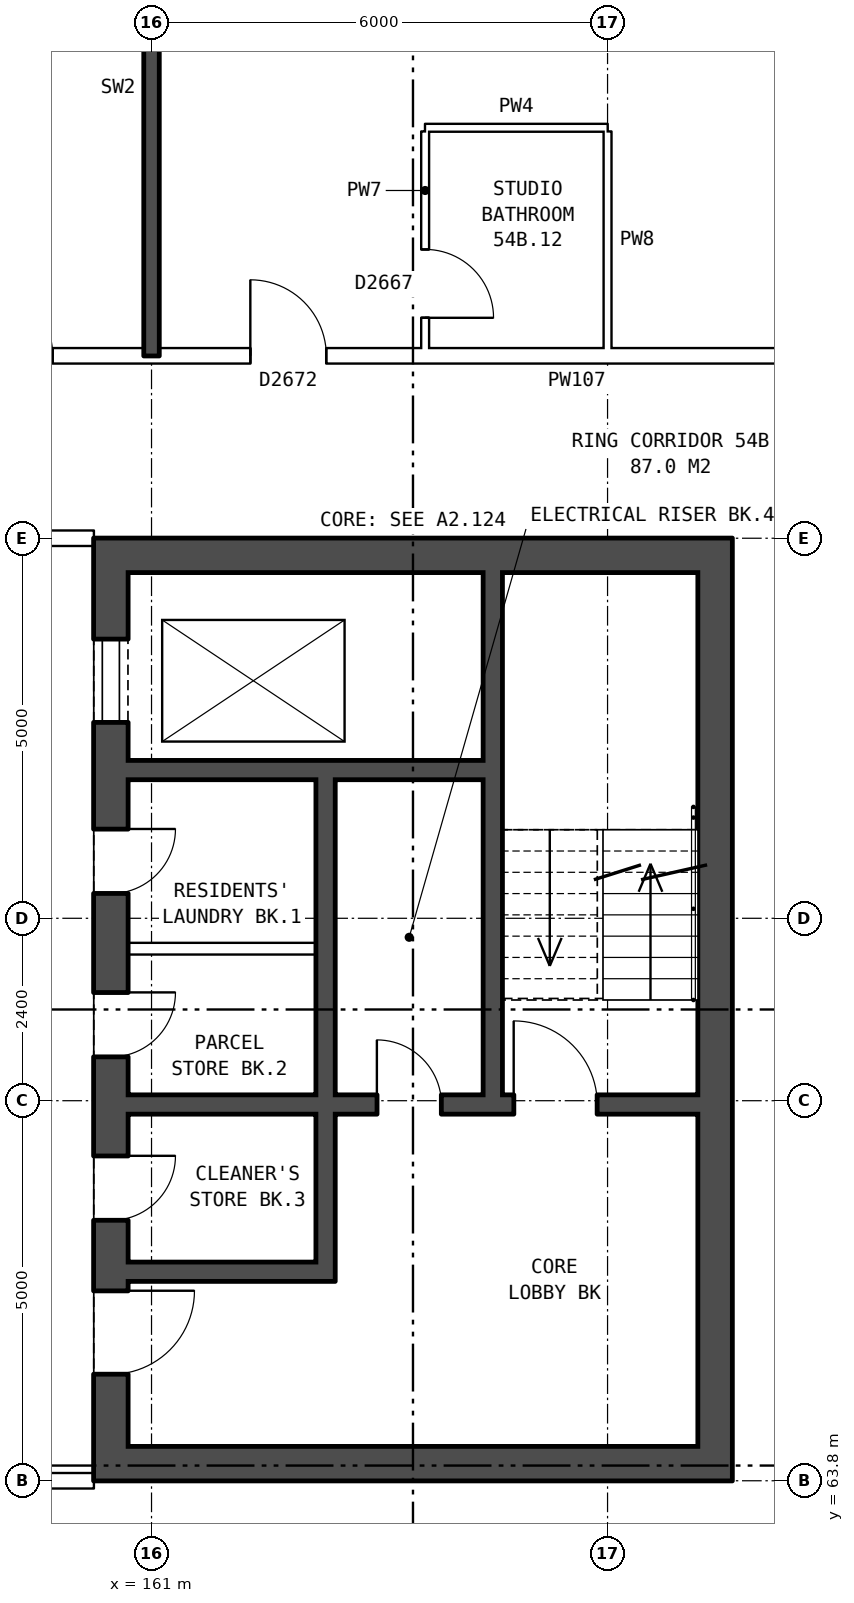
"""IFC4 building model, lengths in metres.
Left out: names, types, materials, properties, quantities, classifications, styles, units other than length and angle.
Written with IfcOpenShell. Run it as: python <this file> out.ifc"""

import sys

from ifc_helpers import new_model, si_unit, direction, frame, frame_2d, origin, place, context, subcontext, project, spatial, rectangle, extrude, element, fill, save


model = new_model("IFC4")
c1 = context("Model", 3, precision=1e-05, world=origin(), true_north=direction((0.0, 1.0)))
c2 = subcontext(c1, "Body", "Model", "MODEL_VIEW")
j1 = project(units=[si_unit("LENGTHUNIT", "METRE"), si_unit("PLANEANGLEUNIT", "RADIAN")], contexts=[c1])
p1 = place(None, origin())
s1 = spatial("IfcSite", under=j1, at=p1, CompositionType="ELEMENT")
p2 = place(p1, origin())
s2 = spatial("IfcBuilding", under=s1, at=p2, CompositionType="ELEMENT")
p3 = place(p2, frame((0.0, 0.0, 191.3)))
s3 = spatial("IfcBuildingStorey", under=s2, at=p3, CompositionType="ELEMENT", Elevation=191.3)
p4 = place(p3, frame((160.465, 76.2, 0.0), z_axis=(0.0, 0.0, 1.0), x_axis=(0.0, -1.0, 0.0)))
e1 = element("IfcWall", 1, at=p4, inside=s3, PredefinedType="SHEAR", context=c2, shape_type="SweptSolid", body=[
    extrude(rectangle(XDim=12.4, YDim=0.45, at=frame_2d((6.2, 0.0))), origin(), (0.0, 0.0, 1.0), 2.85),
])
p5 = place(p4, frame((1.325, 0.0, 0.0)))
e2 = element("IfcOpeningElement", 2, at=p5, cuts=e1, PredefinedType="OPENING", context=c2, shape_type="SweptSolid", body=[
    extrude(rectangle(XDim=1.1, YDim=2.1, at=frame_2d((0.55, 1.05))), frame((0.0, 0.235, 0.0), z_axis=(0.0, -1.0, 0.0), x_axis=(1.0, 0.0, 0.0)), (0.0, 0.0, 1.0), 0.47),
])
p6 = place(p4, frame((3.825, 0.0, 0.0)))
e3 = element("IfcOpeningElement", 3, at=p6, cuts=e1, PredefinedType="OPENING", context=c2, shape_type="SweptSolid", body=[
    extrude(rectangle(XDim=0.85, YDim=2.1, at=frame_2d((0.425, 1.05))), frame((0.0, 0.235, 0.0), z_axis=(0.0, -1.0, 0.0), x_axis=(1.0, 0.0, 0.0)), (0.0, 0.0, 1.0), 0.47),
])
p7 = place(p4, frame((5.975, 0.0, 0.0)))
e4 = element("IfcOpeningElement", 4, at=p7, cuts=e1, PredefinedType="OPENING", context=c2, shape_type="SweptSolid", body=[
    extrude(rectangle(XDim=0.85, YDim=2.1, at=frame_2d((0.425, 1.05))), frame((0.0, 0.235, 0.0), z_axis=(0.0, -1.0, 0.0), x_axis=(1.0, 0.0, 0.0)), (0.0, 0.0, 1.0), 0.47),
])
p8 = place(p4, frame((9.9, 0.0, 0.0)))
e5 = element("IfcOpeningElement", 5, at=p8, cuts=e1, PredefinedType="OPENING", context=c2, shape_type="SweptSolid", body=[
    extrude(rectangle(XDim=1.1, YDim=2.1, at=frame_2d((0.55, 1.05))), frame((0.0, 0.235, 0.0), z_axis=(0.0, -1.0, 0.0), x_axis=(1.0, 0.0, 0.0)), (0.0, 0.0, 1.0), 0.47),
])
p9 = place(p4, frame((8.125, 0.0, 0.0)))
e6 = element("IfcOpeningElement", 6, at=p9, cuts=e1, PredefinedType="OPENING", context=c2, shape_type="SweptSolid", body=[
    extrude(rectangle(XDim=0.85, YDim=2.1, at=frame_2d((0.425, 1.05))), frame((0.0, 0.235, 0.0), z_axis=(0.0, -1.0, 0.0), x_axis=(1.0, 0.0, 0.0)), (0.0, 0.0, 1.0), 0.47),
])
p10 = place(p3, frame((168.415, 76.2, 0.0), z_axis=(0.0, 0.0, 1.0), x_axis=(0.0, -1.0, 0.0)))
e7 = element("IfcWall", 7, at=p10, inside=s3, PredefinedType="SHEAR", context=c2, shape_type="SweptSolid", body=[
    extrude(rectangle(XDim=12.4, YDim=0.45, at=frame_2d((6.2, 0.0))), origin(), (0.0, 0.0, 1.0), 2.85),
])
for number, where, z_axis, x_axis in (
    (8, (160.69, 75.975, 0.0), (0.0, 0.0, 1.0), (1.0, 0.0, 0.0)),
    (9, (160.69, 64.025, 0.0), (0.0, 0.0, 1.0), (1.0, 0.0, 0.0)),
):
    element("IfcWall", number, at=place(p3, frame(where, z_axis=z_axis, x_axis=x_axis)), inside=s3, PredefinedType="SHEAR", context=c2, shape_type="SweptSolid", body=[
        extrude(rectangle(XDim=7.5, YDim=0.45, at=frame_2d((3.75, 0.0))), origin(), (0.0, 0.0, 1.0), 2.85),
    ])
p11 = place(p3, frame((160.69, 73.15, 0.0), z_axis=(0.0, 0.0, 1.0), x_axis=(1.0, 0.0, 0.0)))
e10 = element("IfcWall", 10, at=p11, inside=s3, PredefinedType="SHEAR", context=c2, shape_type="SweptSolid", body=[
    extrude(rectangle(XDim=4.675, YDim=0.25, at=frame_2d((2.337, 0.0))), origin(), (0.0, 0.0, 1.0), 2.85),
])
p12 = place(p3, frame((160.69, 70.8, 0.0), z_axis=(0.0, 0.0, 1.0), x_axis=(1.0, 0.0, 0.0)))
e11 = element("IfcWall", 11, at=p12, inside=s3, PredefinedType="PARTITIONING", context=c2, shape_type="SweptSolid", body=[
    extrude(rectangle(XDim=2.475, YDim=0.15, at=frame_2d((1.238, 0.0))), origin(), (0.0, 0.0, 1.0), 2.85),
])
p13 = place(p3, frame((160.69, 68.75, 0.0), z_axis=(0.0, 0.0, 1.0), x_axis=(1.0, 0.0, 0.0)))
e12 = element("IfcWall", 12, at=p13, inside=s3, PredefinedType="SHEAR", context=c2, shape_type="SweptSolid", body=[
    extrude(rectangle(XDim=7.5, YDim=0.25, at=frame_2d((3.75, 0.0))), origin(), (0.0, 0.0, 1.0), 2.85),
])
p14 = place(p13, frame((5.075, 0.0, 0.0)))
e13 = element("IfcOpeningElement", 13, at=p14, cuts=e12, PredefinedType="OPENING", context=c2, shape_type="SweptSolid", body=[
    extrude(rectangle(XDim=1.1, YDim=2.1, at=frame_2d((0.55, 1.05))), frame((0.0, 0.135, 0.0), z_axis=(0.0, -1.0, 0.0), x_axis=(1.0, 0.0, 0.0)), (0.0, 0.0, 1.0), 0.27),
])
p15 = place(p13, frame((3.275, 0.0, 0.0)))
e14 = element("IfcOpeningElement", 14, at=p15, cuts=e12, PredefinedType="OPENING", context=c2, shape_type="SweptSolid", body=[
    extrude(rectangle(XDim=0.85, YDim=2.1, at=frame_2d((0.425, 1.05))), frame((0.0, 0.135, 0.0), z_axis=(0.0, -1.0, 0.0), x_axis=(1.0, 0.0, 0.0)), (0.0, 0.0, 1.0), 0.27),
])
p16 = place(p3, frame((160.69, 66.55, 0.0), z_axis=(0.0, 0.0, 1.0), x_axis=(1.0, 0.0, 0.0)))
e15 = element("IfcWall", 15, at=p16, inside=s3, PredefinedType="SHEAR", context=c2, shape_type="SweptSolid", body=[
    extrude(rectangle(XDim=2.475, YDim=0.25, at=frame_2d((1.238, 0.0))), origin(), (0.0, 0.0, 1.0), 2.85),
])
p17 = place(p3, frame((163.29, 73.025, 0.0), z_axis=(0.0, 0.0, 1.0), x_axis=(0.0, -1.0, 0.0)))
e16 = element("IfcWall", 16, at=p17, inside=s3, PredefinedType="SHEAR", context=c2, shape_type="SweptSolid", body=[
    extrude(rectangle(XDim=4.15, YDim=0.25, at=frame_2d((2.075, 0.0))), origin(), (0.0, 0.0, 1.0), 2.85),
])
p18 = place(p3, frame((163.29, 68.625, 0.0), z_axis=(0.0, 0.0, 1.0), x_axis=(0.0, -1.0, 0.0)))
e17 = element("IfcWall", 17, at=p18, inside=s3, PredefinedType="SHEAR", context=c2, shape_type="SweptSolid", body=[
    extrude(rectangle(XDim=2.2, YDim=0.25, at=frame_2d((1.1, 0.0))), origin(), (0.0, 0.0, 1.0), 2.85),
])
p19 = place(p3, frame((165.49, 75.75, 0.0), z_axis=(0.0, 0.0, 1.0), x_axis=(0.0, -1.0, 0.0)))
e18 = element("IfcWall", 18, at=p19, inside=s3, PredefinedType="SHEAR", context=c2, shape_type="SweptSolid", body=[
    extrude(rectangle(XDim=6.875, YDim=0.25, at=frame_2d((3.438, 0.0))), origin(), (0.0, 0.0, 1.0), 2.85),
])
p20 = place(p3, frame((157.24, 63.8, 0.0), z_axis=(0.0, 0.0, 1.0), x_axis=(1.0, 0.0, 0.0)))
e19 = element("IfcWall", 19, at=p20, inside=s3, PredefinedType="PARTITIONING", context=c2, shape_type="SweptSolid", body=[
    extrude(rectangle(XDim=3.0, YDim=0.2, at=frame_2d((1.5, 0.0))), origin(), (0.0, 0.0, 1.0), 2.85),
])
p21 = place(p20, frame((1.0, 0.0, 0.0)))
e20 = element("IfcOpeningElement", 20, at=p21, cuts=e19, PredefinedType="OPENING", context=c2, shape_type="SweptSolid", body=[
    extrude(rectangle(XDim=1.0, YDim=2.1, at=frame_2d((0.5, 1.05))), frame((0.0, 0.11, 0.0), z_axis=(0.0, -1.0, 0.0), x_axis=(1.0, 0.0, 0.0)), (0.0, 0.0, 1.0), 0.22),
])
p22 = place(p3, frame((157.24, 76.2, 0.0), z_axis=(0.0, 0.0, 1.0), x_axis=(1.0, 0.0, 0.0)))
e21 = element("IfcWall", 21, at=p22, inside=s3, PredefinedType="PARTITIONING", context=c2, shape_type="SweptSolid", body=[
    extrude(rectangle(XDim=3.0, YDim=0.2, at=frame_2d((1.5, 0.0))), origin(), (0.0, 0.0, 1.0), 2.85),
])
p23 = place(p22, frame((1.0, 0.0, 0.0)))
e22 = element("IfcOpeningElement", 22, at=p23, cuts=e21, PredefinedType="OPENING", context=c2, shape_type="SweptSolid", body=[
    extrude(rectangle(XDim=1.0, YDim=2.1, at=frame_2d((0.5, 1.05))), frame((0.0, 0.11, 0.0), z_axis=(0.0, -1.0, 0.0), x_axis=(1.0, 0.0, 0.0)), (0.0, 0.0, 1.0), 0.22),
])
p24 = place(p3, frame((155.1, 78.6, 0.0), z_axis=(0.0, 0.0, 1.0), x_axis=(1.0, 0.0, 0.0)))
e23 = element("IfcWall", 23, at=p24, inside=s3, PredefinedType="PARTITIONING", context=c2, shape_type="SweptSolid", body=[
    extrude(rectangle(XDim=14.79, YDim=0.2, at=frame_2d((7.395, 0.0))), origin(), (0.0, 0.0, 1.0), 2.85),
])
p25 = place(p24, frame((3.6, 0.0, 0.0)))
e24 = element("IfcOpeningElement", 24, at=p25, cuts=e23, PredefinedType="OPENING", context=c2, shape_type="SweptSolid", body=[
    extrude(rectangle(XDim=1.0, YDim=2.1, at=frame_2d((0.5, 1.05))), frame((0.0, 0.11, 0.0), z_axis=(0.0, -1.0, 0.0), x_axis=(1.0, 0.0, 0.0)), (0.0, 0.0, 1.0), 0.22),
])
p26 = place(p24, frame((7.2, 0.0, 0.0)))
e25 = element("IfcOpeningElement", 25, at=p26, cuts=e23, PredefinedType="OPENING", context=c2, shape_type="SweptSolid", body=[
    extrude(rectangle(XDim=1.0, YDim=2.1, at=frame_2d((0.5, 1.05))), frame((0.0, 0.11, 0.0), z_axis=(0.0, -1.0, 0.0), x_axis=(1.0, 0.0, 0.0)), (0.0, 0.0, 1.0), 0.22),
])
p27 = place(p3, frame((164.6, 81.6, 0.0), z_axis=(0.0, 0.0, 1.0), x_axis=(1.0, 0.0, 0.0)))
e26 = element("IfcWall", 26, at=p27, inside=s3, PredefinedType="PARTITIONING", context=c2, shape_type="SweptSolid", body=[
    extrude(rectangle(XDim=2.4, YDim=0.1, at=frame_2d((1.2, 0.0))), origin(), (0.0, 0.0, 1.0), 2.85),
])
p28 = place(p3, frame((161.0, 78.6, 0.0), z_axis=(0.0, 0.0, 1.0), x_axis=(0.0, 1.0, 0.0)))
e27 = element("IfcWall", 27, at=p28, inside=s3, PredefinedType="SOLIDWALL", context=c2, shape_type="SweptSolid", body=[
    extrude(rectangle(XDim=7.04, YDim=0.2, at=frame_2d((3.52, 0.0))), origin(), (0.0, 0.0, 1.0), 2.85),
])
p29 = place(p3, frame((164.6, 78.7, 0.0), z_axis=(0.0, 0.0, 1.0), x_axis=(0.0, 1.0, 0.0)))
e28 = element("IfcWall", 28, at=p29, inside=s3, PredefinedType="PARTITIONING", context=c2, shape_type="SweptSolid", body=[
    extrude(rectangle(XDim=2.85, YDim=0.1, at=frame_2d((1.425, 0.0))), origin(), (0.0, 0.0, 1.0), 2.85),
])
p30 = place(p29, frame((0.4, 0.0, 0.0)))
e29 = element("IfcOpeningElement", 29, at=p30, cuts=e28, PredefinedType="OPENING", context=c2, shape_type="SweptSolid", body=[
    extrude(rectangle(XDim=0.9, YDim=2.1, at=frame_2d((0.45, 1.05))), frame((0.0, 0.06, 0.0), z_axis=(0.0, -1.0, 0.0), x_axis=(1.0, 0.0, 0.0)), (0.0, 0.0, 1.0), 0.12),
])
p31 = place(p3, frame((167.0, 78.7, 0.0), z_axis=(0.0, 0.0, 1.0), x_axis=(0.0, 1.0, 0.0)))
e30 = element("IfcWall", 30, at=p31, inside=s3, PredefinedType="PARTITIONING", context=c2, shape_type="SweptSolid", body=[
    extrude(rectangle(XDim=2.85, YDim=0.1, at=frame_2d((1.425, 0.0))), origin(), (0.0, 0.0, 1.0), 2.85),
])
p32 = place(p5, origin())
e31 = element("IfcDoor", 31, at=p32, inside=s3, OperationType="DOUBLE_DOOR_SLIDING", PredefinedType="DOOR", context=c2, shape_type="SweptSolid", body=[
    extrude(rectangle(XDim=1.1, YDim=2.1, at=frame_2d((0.55, 1.05))), frame((0.0, 0.21, 0.0), z_axis=(0.0, -1.0, 0.0), x_axis=(1.0, 0.0, 0.0)), (0.0, 0.0, 1.0), 0.05),
])
fill(e2, e31)
p33 = place(p6, origin())
e32 = element("IfcDoor", 32, at=p33, inside=s3, OperationType="SINGLE_SWING_LEFT", PredefinedType="DOOR", context=c2, shape_type="SweptSolid", body=[
    extrude(rectangle(XDim=0.85, YDim=2.1, at=frame_2d((0.425, 1.05))), frame((0.0, 0.21, 0.0), z_axis=(0.0, -1.0, 0.0), x_axis=(1.0, 0.0, 0.0)), (0.0, 0.0, 1.0), 0.05),
])
fill(e3, e32)
p34 = place(p7, origin())
e33 = element("IfcDoor", 33, at=p34, inside=s3, OperationType="SINGLE_SWING_LEFT", PredefinedType="DOOR", context=c2, shape_type="SweptSolid", body=[
    extrude(rectangle(XDim=0.85, YDim=2.1, at=frame_2d((0.425, 1.05))), frame((0.0, 0.21, 0.0), z_axis=(0.0, -1.0, 0.0), x_axis=(1.0, 0.0, 0.0)), (0.0, 0.0, 1.0), 0.05),
])
fill(e4, e33)
p35 = place(p8, origin())
e34 = element("IfcDoor", 34, at=p35, inside=s3, OperationType="SINGLE_SWING_LEFT", PredefinedType="DOOR", context=c2, shape_type="SweptSolid", body=[
    extrude(rectangle(XDim=1.1, YDim=2.1, at=frame_2d((0.55, 1.05))), frame((0.0, 0.21, 0.0), z_axis=(0.0, -1.0, 0.0), x_axis=(1.0, 0.0, 0.0)), (0.0, 0.0, 1.0), 0.05),
])
fill(e5, e34)
p36 = place(p14, origin())
e35 = element("IfcDoor", 35, at=p36, inside=s3, OperationType="SINGLE_SWING_LEFT", PredefinedType="DOOR", context=c2, shape_type="SweptSolid", body=[
    extrude(rectangle(XDim=1.1, YDim=2.1, at=frame_2d((0.55, 1.05))), frame((0.0, 0.025, 0.0), z_axis=(0.0, -1.0, 0.0), x_axis=(1.0, 0.0, 0.0)), (0.0, 0.0, 1.0), 0.05),
])
fill(e13, e35)
p37 = place(p9, origin())
e36 = element("IfcDoor", 36, at=p37, inside=s3, OperationType="SINGLE_SWING_LEFT", PredefinedType="DOOR", context=c2, shape_type="SweptSolid", body=[
    extrude(rectangle(XDim=0.85, YDim=2.1, at=frame_2d((0.425, 1.05))), frame((0.0, 0.21, 0.0), z_axis=(0.0, -1.0, 0.0), x_axis=(1.0, 0.0, 0.0)), (0.0, 0.0, 1.0), 0.05),
])
fill(e6, e36)
p38 = place(p15, origin())
e37 = element("IfcDoor", 37, at=p38, inside=s3, OperationType="SINGLE_SWING_LEFT", PredefinedType="DOOR", context=c2, shape_type="SweptSolid", body=[
    extrude(rectangle(XDim=0.85, YDim=2.1, at=frame_2d((0.425, 1.05))), frame((0.0, 0.025, 0.0), z_axis=(0.0, -1.0, 0.0), x_axis=(1.0, 0.0, 0.0)), (0.0, 0.0, 1.0), 0.05),
])
fill(e14, e37)
p39 = place(p25, origin())
e38 = element("IfcDoor", 38, at=p39, inside=s3, OperationType="SINGLE_SWING_LEFT", PredefinedType="DOOR", context=c2, shape_type="SweptSolid", body=[
    extrude(rectangle(XDim=1.0, YDim=2.1, at=frame_2d((0.5, 1.05))), frame((0.0, 0.025, 0.0), z_axis=(0.0, -1.0, 0.0), x_axis=(1.0, 0.0, 0.0)), (0.0, 0.0, 1.0), 0.05),
])
fill(e24, e38)
p40 = place(p26, origin())
e39 = element("IfcDoor", 39, at=p40, inside=s3, OperationType="SINGLE_SWING_LEFT", PredefinedType="DOOR", context=c2, shape_type="SweptSolid", body=[
    extrude(rectangle(XDim=1.0, YDim=2.1, at=frame_2d((0.5, 1.05))), frame((0.0, 0.025, 0.0), z_axis=(0.0, -1.0, 0.0), x_axis=(1.0, 0.0, 0.0)), (0.0, 0.0, 1.0), 0.05),
])
fill(e25, e39)
p41 = place(p30, frame((0.9, 0.0, 0.0), z_axis=(0.0, 0.0, 1.0), x_axis=(-1.0, 0.0, 0.0)))
e40 = element("IfcDoor", 40, at=p41, inside=s3, OperationType="SINGLE_SWING_RIGHT", PredefinedType="DOOR", context=c2, shape_type="SweptSolid", body=[
    extrude(rectangle(XDim=0.9, YDim=2.1, at=frame_2d((0.45, 1.05))), frame((0.0, 0.025, 0.0), z_axis=(0.0, -1.0, 0.0), x_axis=(1.0, 0.0, 0.0)), (0.0, 0.0, 1.0), 0.05),
])
fill(e29, e40)
save(model, sys.argv[1])
